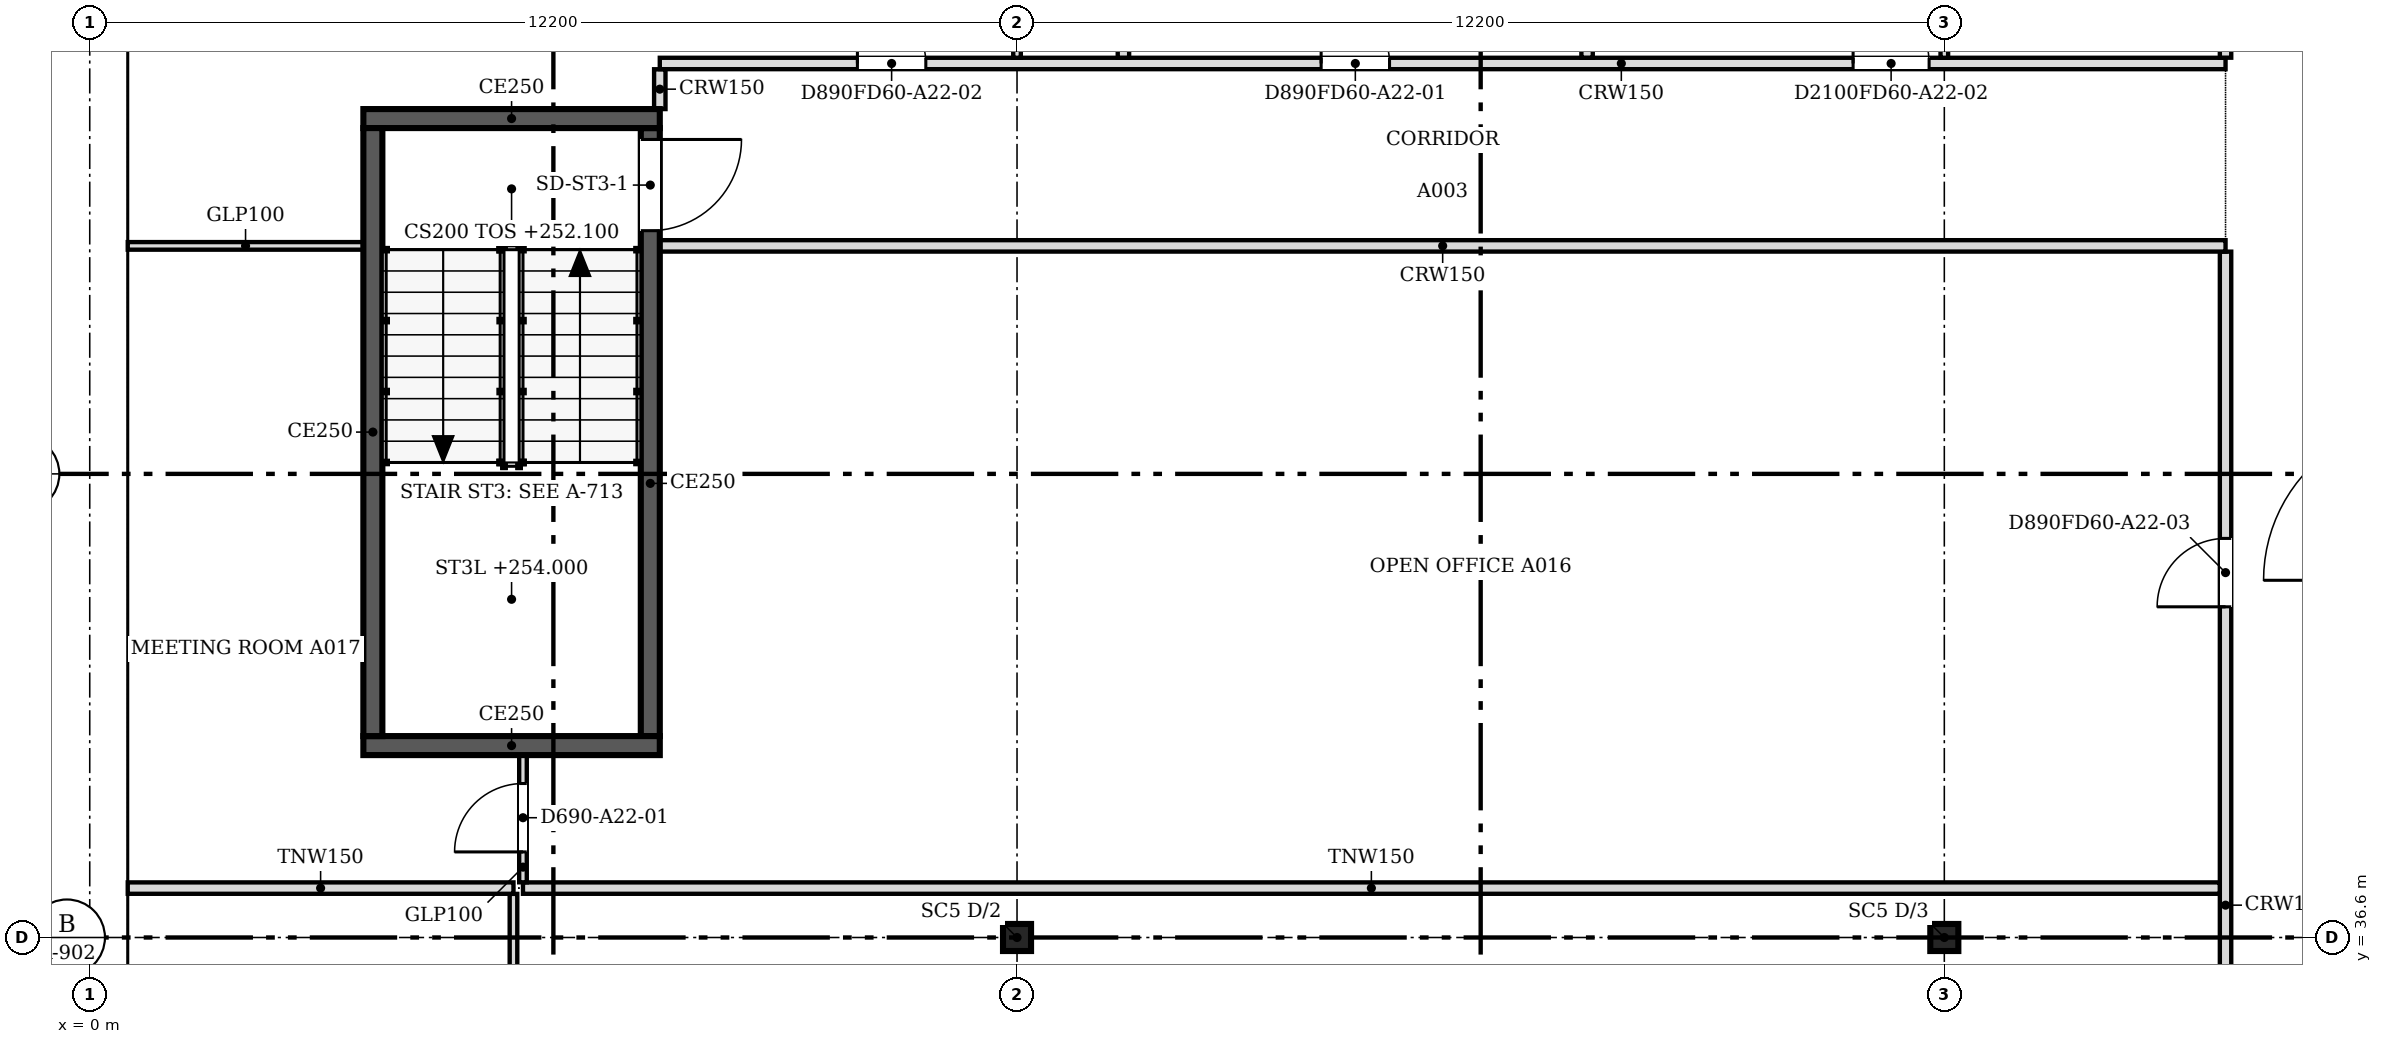
"""IFC4 building model, lengths in metres.
Left out: names, types, materials, properties, quantities, classifications, styles, units other than length and angle.
Written with IfcOpenShell. Run it as: python <this file> out.ifc"""

import sys

from ifc_helpers import new_model, si_unit, direction, frame, frame_2d, origin, origin_2d, place, context, subcontext, project, spatial, polyline, rectangle, i_section, outline, extrude, faceted_brep, source, transform, mapped, element, fill, save


model = new_model("IFC4")
c1 = context("Model", 3, precision=1e-05, world=origin(), true_north=direction((0.0, 1.0)))
c2 = subcontext(c1, "Body", "Model", "MODEL_VIEW")
j1 = project(units=[si_unit("LENGTHUNIT", "METRE"), si_unit("PLANEANGLEUNIT", "RADIAN")], contexts=[c1])
p1 = place(None, origin())
s1 = spatial("IfcSite", under=j1, at=p1, CompositionType="ELEMENT")
p2 = place(p1, origin())
s2 = spatial("IfcBuilding", under=s1, at=p2, CompositionType="ELEMENT")
p3 = place(p2, frame((0.0, 0.0, 252.1)))
s3 = spatial("IfcBuildingStorey", under=s2, at=p3, CompositionType="ELEMENT", Elevation=252.1)
for number, where, z_axis, x_axis in (
    (1, (12.2, 36.6, 0.0), (0.0, 0.0, 1.0), (1.0, 0.0, 0.0)),
    (2, (24.4, 36.6, 0.0), (0.0, 0.0, 1.0), (1.0, 0.0, 0.0)),
):
    element("IfcColumn", number, at=place(p3, frame(where, z_axis=z_axis, x_axis=x_axis)), inside=s3, PredefinedType="COLUMN", context=c2, shape_type="SweptSolid", body=[
        extrude(i_section(OverallWidth=0.369, OverallDepth=0.356, WebThickness=0.011, FlangeThickness=0.018, at=origin_2d()), origin(), (0.0, 0.0, 1.0), 3.6),
    ])
m1 = source(origin(), c2, "Body", "Brep", [
    faceted_brep([(3.003, -0.25, 0.0), (6.053, -0.25, 3.8), (3.003, -0.25, 7.6), (0.0, -0.25, 3.8), (0.047, 0.25, 3.859), (3.003, 0.25, 7.6), (6.053, 0.25, 3.8), (3.003, 0.25, 0.0), (0.047, 0.25, 3.741), (0.0, 0.0, 3.8)], [[[0, 1, 2, 3]], [[4, 5, 6, 7, 8]], [[7, 6, 1, 0]], [[6, 5, 2, 1]], [[5, 4, 9, 3, 2]], [[8, 7, 0, 3, 9]], [[8, 9, 4]]]),
])
p4 = place(p3, frame((0.25, 48.753, -3.8), z_axis=(0.0, 0.0, 1.0), x_axis=(0.0, -1.0, 0.0)))
e3 = element("IfcWall", 3, at=p4, inside=s3, PredefinedType="SOLIDWALL", context=c2, shape_type="MappedRepresentation", body=[
    mapped(m1, transform((0.0, 0.0, 0.0), scale=1.0)),
])
m2 = source(origin(), c2, "Body", "SweptSolid", [
    extrude(outline(polyline([(3.005, 0.401), (5.733, 3.8), (3.005, 7.199), (0.319, 3.8), (3.005, 0.401)])), frame((0.0, 0.26, 0.0), z_axis=(0.0, -1.0, 0.0), x_axis=(1.0, 0.0, 0.0)), (0.0, 0.0, 1.0), 0.52),
])
p5 = place(p4, origin())
e4 = element("IfcOpeningElement", 4, at=p5, cuts=e3, PredefinedType="OPENING", context=c2, shape_type="MappedRepresentation", body=[
    mapped(m2, transform((0.0, 0.0, 0.0), scale=1.0)),
])
m3 = source(origin(), c2, "Body", "Brep", [
    faceted_brep([(3.05, -0.25, 0.0), (6.1, -0.25, 3.8), (6.1, -0.25, 3.8), (3.05, -0.25, 7.6), (0.0, -0.25, 3.8), (0.0, 0.25, 3.8), (3.05, 0.25, 7.6), (6.1, 0.25, 3.8), (6.1, 0.25, 3.8), (3.05, 0.25, 0.0)], [[[0, 1, 2, 3, 4]], [[5, 6, 7, 8, 9]], [[9, 8, 1, 0]], [[7, 6, 3, 2]], [[6, 5, 4, 3]], [[5, 9, 0, 4]], [[1, 8, 7, 2]]]),
])
p6 = place(p3, frame((0.25, 42.7, -3.8), z_axis=(0.0, 0.0, 1.0), x_axis=(0.0, -1.0, 0.0)))
e5 = element("IfcWall", 5, at=p6, inside=s3, PredefinedType="SOLIDWALL", context=c2, shape_type="MappedRepresentation", body=[
    mapped(m3, transform((0.0, 0.0, 0.0), scale=1.0)),
])
m4 = source(origin(), c2, "Body", "SweptSolid", [
    extrude(outline(polyline([(3.05, 0.399), (5.78, 3.8), (3.05, 7.2), (0.321, 3.8), (3.05, 0.399)])), frame((0.0, 0.26, 0.0), z_axis=(0.0, -1.0, 0.0), x_axis=(1.0, 0.0, 0.0)), (0.0, 0.0, 1.0), 0.52),
])
p7 = place(p6, origin())
e6 = element("IfcOpeningElement", 6, at=p7, cuts=e5, PredefinedType="OPENING", context=c2, shape_type="MappedRepresentation", body=[
    mapped(m4, transform((0.0, 0.0, 0.0), scale=1.0)),
])
m5 = source(origin(), c2, "Body", "SweptSolid", [
    extrude(outline(polyline([(3.05, 0.0), (6.1, 3.8), (3.05, 7.6), (0.0, 3.8), (3.05, 0.0)])), frame((0.0, 0.25, 0.0), z_axis=(0.0, -1.0, 0.0), x_axis=(1.0, 0.0, 0.0)), (0.0, 0.0, 1.0), 0.5),
])
p8 = place(p3, frame((0.25, 36.6, -3.8), z_axis=(0.0, 0.0, 1.0), x_axis=(0.0, -1.0, 0.0)))
e7 = element("IfcWall", 7, at=p8, inside=s3, PredefinedType="SOLIDWALL", context=c2, shape_type="MappedRepresentation", body=[
    mapped(m5, transform((0.0, 0.0, 0.0), scale=1.0)),
])
p9 = place(p8, origin())
e8 = element("IfcOpeningElement", 8, at=p9, cuts=e7, PredefinedType="OPENING", context=c2, shape_type="MappedRepresentation", body=[
    mapped(m4, transform((0.0, 0.0, 0.0), scale=1.0)),
])
p10 = place(p2, frame((0.0, 0.0, 255.9)))
s4 = spatial("IfcBuildingStorey", under=s2, at=p10, CompositionType="ELEMENT", Elevation=255.9)
m6 = source(origin(), c2, "Body", "Brep", [
    faceted_brep([(0.047, -0.25, 0.0), (3.05, -0.25, 3.8), (0.047, -0.25, 7.6), (0.0, -0.25, 7.54), (0.0, -0.25, 0.06), (0.093, 0.25, 7.541), (3.05, 0.25, 3.8), (0.093, 0.25, 0.059), (0.047, 0.0, 0.0), (0.047, 0.0, 7.6)], [[[0, 1, 2, 3, 4]], [[5, 6, 7]], [[7, 6, 1, 0, 8]], [[6, 5, 9, 2, 1]], [[3, 2, 9]], [[8, 0, 4]], [[7, 8, 4, 3, 9, 5]]]),
])
p11 = place(p10, frame((0.25, 48.8, -3.8), z_axis=(0.0, 0.0, 1.0), x_axis=(0.0, -1.0, 0.0)))
e9 = element("IfcWall", 9, at=p11, inside=s4, PredefinedType="SOLIDWALL", context=c2, shape_type="MappedRepresentation", body=[
    mapped(m6, transform((0.0, 0.0, 0.0), scale=1.0)),
])
m7 = source(origin(), c2, "Body", "SweptSolid", [
    extrude(outline(polyline([(0.247, 0.656), (2.731, 3.8), (0.247, 6.944), (0.247, 0.656)])), frame((0.0, 0.26, 0.0), z_axis=(0.0, -1.0, 0.0), x_axis=(1.0, 0.0, 0.0)), (0.0, 0.0, 1.0), 0.52),
])
p12 = place(p11, origin())
e10 = element("IfcOpeningElement", 10, at=p12, cuts=e9, PredefinedType="OPENING", context=c2, shape_type="MappedRepresentation", body=[
    mapped(m7, transform((0.0, 0.0, 0.0), scale=1.0)),
])
m8 = source(origin(), c2, "Body", "SweptSolid", [
    extrude(outline(polyline([(3.05, 0.0), (6.1, 3.8), (3.05, 7.6), (0.0, 3.8), (3.05, 0.0)])), frame((0.0, 0.25, 0.0), z_axis=(0.0, -1.0, 0.0), x_axis=(1.0, 0.0, 0.0)), (0.0, 0.0, 1.0), 0.5),
])
p13 = place(p10, frame((0.25, 45.75, -3.8), z_axis=(0.0, 0.0, 1.0), x_axis=(0.0, -1.0, 0.0)))
e11 = element("IfcWall", 11, at=p13, inside=s4, PredefinedType="SOLIDWALL", context=c2, shape_type="MappedRepresentation", body=[
    mapped(m8, transform((0.0, 0.0, 0.0), scale=1.0)),
])
m9 = source(origin(), c2, "Body", "SweptSolid", [
    extrude(outline(polyline([(3.05, 0.399), (5.78, 3.8), (3.05, 7.2), (0.321, 3.8), (3.05, 0.399)])), frame((0.0, 0.26, 0.0), z_axis=(0.0, -1.0, 0.0), x_axis=(1.0, 0.0, 0.0)), (0.0, 0.0, 1.0), 0.52),
])
p14 = place(p13, origin())
e12 = element("IfcOpeningElement", 12, at=p14, cuts=e11, PredefinedType="OPENING", context=c2, shape_type="MappedRepresentation", body=[
    mapped(m9, transform((0.0, 0.0, 0.0), scale=1.0)),
])
m10 = source(origin(), c2, "Body", "Brep", [
    faceted_brep([(3.05, -0.25, 0.0), (6.1, -0.25, 3.8), (6.1, -0.25, 3.8), (3.05, -0.25, 7.6), (0.0, -0.25, 3.8), (0.0, 0.25, 3.8), (3.05, 0.25, 7.6), (6.1, 0.25, 3.8), (6.1, 0.25, 3.8), (3.05, 0.25, 0.0)], [[[0, 1, 2, 3, 4]], [[5, 6, 7, 8, 9]], [[9, 8, 1, 0]], [[7, 6, 3, 2]], [[6, 5, 4, 3]], [[5, 9, 0, 4]], [[1, 8, 7, 2]]]),
])
p15 = place(p10, frame((0.25, 39.65, -3.8), z_axis=(0.0, 0.0, 1.0), x_axis=(0.0, -1.0, 0.0)))
e13 = element("IfcWall", 13, at=p15, inside=s4, PredefinedType="SOLIDWALL", context=c2, shape_type="MappedRepresentation", body=[
    mapped(m10, transform((0.0, 0.0, 0.0), scale=1.0)),
])
p16 = place(p15, origin())
e14 = element("IfcOpeningElement", 14, at=p16, cuts=e13, PredefinedType="OPENING", context=c2, shape_type="MappedRepresentation", body=[
    mapped(m9, transform((0.0, 0.0, 0.0), scale=1.0)),
])
p17 = place(p3, frame((7.5, 39.125, 0.0), z_axis=(0.0, 0.0, 1.0), x_axis=(-1.0, 0.0, 0.0)))
e15 = element("IfcWall", 15, at=p17, inside=s3, PredefinedType="SOLIDWALL", context=c2, shape_type="SweptSolid", body=[
    extrude(rectangle(XDim=3.9, YDim=0.25, at=frame_2d((1.95, 0.0))), origin(), (0.0, 0.0, 1.0), 3.8),
])
p18 = place(p3, frame((3.725, 39.25, 0.0), z_axis=(0.0, 0.0, 1.0), x_axis=(0.0, 1.0, 0.0)))
e16 = element("IfcWall", 16, at=p18, inside=s3, PredefinedType="SOLIDWALL", context=c2, shape_type="SweptSolid", body=[
    extrude(rectangle(XDim=8.0, YDim=0.25, at=frame_2d((4.0, 0.0))), origin(), (0.0, 0.0, 1.0), 3.8),
])
p19 = place(p3, frame((3.6, 47.375, 0.0), z_axis=(0.0, 0.0, 1.0), x_axis=(1.0, 0.0, 0.0)))
e17 = element("IfcWall", 17, at=p19, inside=s3, PredefinedType="SOLIDWALL", context=c2, shape_type="SweptSolid", body=[
    extrude(rectangle(XDim=3.9, YDim=0.25, at=frame_2d((1.95, 0.0))), origin(), (0.0, 0.0, 1.0), 3.8),
])
p20 = place(p3, frame((7.375, 47.25, 0.0), z_axis=(0.0, 0.0, 1.0), x_axis=(0.0, -1.0, 0.0)))
e18 = element("IfcWall", 18, at=p20, inside=s3, PredefinedType="SOLIDWALL", context=c2, shape_type="SweptSolid", body=[
    extrude(rectangle(XDim=8.0, YDim=0.25, at=frame_2d((4.0, 0.0))), origin(), (0.0, 0.0, 1.0), 3.8),
])
m11 = source(origin(), c2, "Body", "SweptSolid", [
    extrude(rectangle(XDim=1.2, YDim=2.1, at=frame_2d((0.6, 1.05))), frame((0.0, 0.135, 0.0), z_axis=(0.0, -1.0, 0.0), x_axis=(1.0, 0.0, 0.0)), (0.0, 0.0, 1.0), 0.27),
])
p21 = place(p20, frame((0.15, 0.0, 0.0)))
e19 = element("IfcOpeningElement", 19, at=p21, cuts=e18, PredefinedType="OPENING", context=c2, shape_type="MappedRepresentation", body=[
    mapped(m11, transform((0.0, 0.0, 0.0), scale=1.0)),
])
p22 = place(p3, frame((28.1, 22.076, 0.0), z_axis=(0.0, 0.0, 1.0), x_axis=(0.0, 1.0, 0.0)))
e20 = element("IfcWall", 20, at=p22, inside=s3, PredefinedType="PARTITIONING", context=c2, shape_type="SweptSolid", body=[
    extrude(rectangle(XDim=23.548, YDim=0.15, at=frame_2d((11.774, 0.0))), origin(), (0.0, 0.0, 1.0), 3.067),
])
m12 = source(origin(), c2, "Body", "SweptSolid", [
    extrude(rectangle(XDim=1.0, YDim=2.1, at=frame_2d((0.5, 1.05))), frame((0.0, 0.085, 0.0), z_axis=(0.0, -1.0, 0.0), x_axis=(1.0, 0.0, 0.0)), (0.0, 0.0, 1.0), 0.17),
])
p23 = place(p22, frame((2.5, 0.0, 0.0)))
e21 = element("IfcOpeningElement", 21, at=p23, cuts=e20, PredefinedType="OPENING", context=c2, shape_type="MappedRepresentation", body=[
    mapped(m12, transform((0.0, 0.0, 0.0), scale=1.0)),
])
m13 = source(origin(), c2, "Body", "SweptSolid", [
    extrude(rectangle(XDim=0.9, YDim=2.1, at=frame_2d((0.45, 1.05))), frame((0.0, 0.085, 0.0), z_axis=(0.0, -1.0, 0.0), x_axis=(1.0, 0.0, 0.0)), (0.0, 0.0, 1.0), 0.17),
])
p24 = place(p22, frame((18.875, 0.0, 0.0)))
e22 = element("IfcOpeningElement", 22, at=p24, cuts=e20, PredefinedType="OPENING", context=c2, shape_type="MappedRepresentation", body=[
    mapped(m13, transform((0.0, 0.0, 0.0), scale=1.0)),
])
p25 = place(p22, frame((10.124, 0.0, 0.0)))
e23 = element("IfcOpeningElement", 23, at=p25, cuts=e20, PredefinedType="OPENING", context=c2, shape_type="MappedRepresentation", body=[
    mapped(m13, transform((0.0, 0.0, 0.0), scale=1.0)),
])
p26 = place(p3, frame((5.575, 32.571, 0.0), z_axis=(0.0, 0.0, 1.0), x_axis=(0.0, 1.0, 0.0)))
e24 = element("IfcWall", 24, at=p26, inside=s3, PredefinedType="PARTITIONING", context=c2, shape_type="SweptSolid", body=[
    extrude(rectangle(XDim=4.603, YDim=0.1, at=frame_2d((2.301, 0.0))), origin(), (0.0, 0.0, 1.0), 3.067),
])
m14 = source(origin(), c2, "Body", "SweptSolid", [
    extrude(rectangle(XDim=0.9, YDim=2.1, at=frame_2d((0.45, 1.05))), frame((0.0, 0.06, 0.0), z_axis=(0.0, -1.0, 0.0), x_axis=(1.0, 0.0, 0.0)), (0.0, 0.0, 1.0), 0.12),
])
p27 = place(p26, frame((1.9, 0.0, 0.0)))
e25 = element("IfcOpeningElement", 25, at=p27, cuts=e24, PredefinedType="OPENING", context=c2, shape_type="MappedRepresentation", body=[
    mapped(m14, transform((0.0, 0.0, 0.0), scale=1.0)),
])
p28 = place(p3, frame((0.5, 37.25, 0.0), z_axis=(0.0, 0.0, 1.0), x_axis=(1.0, 0.0, 0.0)))
e26 = element("IfcWall", 26, at=p28, inside=s3, PredefinedType="PARTITIONING", context=c2, shape_type="SweptSolid", body=[
    extrude(rectangle(XDim=5.075, YDim=0.15, at=frame_2d((2.538, 0.0))), origin(), (0.0, 0.0, 1.0), 3.067),
])
p29 = place(p3, frame((5.7, 37.25, 0.0), z_axis=(0.0, 0.0, 1.0), x_axis=(1.0, 0.0, 0.0)))
e27 = element("IfcWall", 27, at=p29, inside=s3, PredefinedType="PARTITIONING", context=c2, shape_type="SweptSolid", body=[
    extrude(rectangle(XDim=22.324, YDim=0.15, at=frame_2d((11.162, 0.0))), origin(), (0.0, 0.0, 1.0), 3.067),
])
p30 = place(p3, frame((5.7, 37.326, 0.0), z_axis=(0.0, 0.0, 1.0), x_axis=(0.0, 1.0, 0.0)))
e28 = element("IfcWall", 28, at=p30, inside=s3, PredefinedType="PARTITIONING", context=c2, shape_type="SweptSolid", body=[
    extrude(rectangle(XDim=1.674, YDim=0.1, at=frame_2d((0.837, 0.0))), origin(), (0.0, 0.0, 1.0), 3.067),
])
p31 = place(p30, frame((0.4, 0.0, 0.0)))
e29 = element("IfcOpeningElement", 29, at=p31, cuts=e28, PredefinedType="OPENING", context=c2, shape_type="MappedRepresentation", body=[
    mapped(m14, transform((0.0, 0.0, 0.0), scale=1.0)),
])
p32 = place(p3, frame((0.5, 45.7, 0.0), z_axis=(0.0, 0.0, 1.0), x_axis=(1.0, 0.0, 0.0)))
e30 = element("IfcWall", 30, at=p32, inside=s3, PredefinedType="PARTITIONING", context=c2, shape_type="SweptSolid", body=[
    extrude(rectangle(XDim=3.1, YDim=0.1, at=frame_2d((1.55, 0.0))), origin(), (0.0, 0.0, 1.0), 3.067),
])
p33 = place(p3, frame((7.5, 45.7, 0.0), z_axis=(0.0, 0.0, 1.0), x_axis=(1.0, 0.0, 0.0)))
e31 = element("IfcWall", 31, at=p33, inside=s3, PredefinedType="PARTITIONING", context=c2, shape_type="SweptSolid", body=[
    extrude(rectangle(XDim=20.6, YDim=0.15, at=frame_2d((10.3, 0.0))), origin(), (0.0, 0.0, 1.0), 3.067),
])
p34 = place(p3, frame((7.5, 47.5, 0.0), z_axis=(0.0, 0.0, 1.0), x_axis=(0.0, 1.0, 0.0)))
e32 = element("IfcWall", 32, at=p34, inside=s3, PredefinedType="PARTITIONING", context=c2, shape_type="SweptSolid", body=[
    extrude(rectangle(XDim=0.524, YDim=0.15, at=frame_2d((0.262, 0.0))), origin(), (0.0, 0.0, 1.0), 3.067),
])
p35 = place(p3, frame((7.5, 48.1, 0.0), z_axis=(0.0, 0.0, 1.0), x_axis=(1.0, 0.0, 0.0)))
e33 = element("IfcWall", 33, at=p35, inside=s3, PredefinedType="PARTITIONING", context=c2, shape_type="SweptSolid", body=[
    extrude(rectangle(XDim=20.6, YDim=0.15, at=frame_2d((10.3, 0.0))), origin(), (0.0, 0.0, 1.0), 3.067),
])
p36 = place(p35, frame((8.701, 0.0, 0.0)))
e34 = element("IfcOpeningElement", 34, at=p36, cuts=e33, PredefinedType="OPENING", context=c2, shape_type="MappedRepresentation", body=[
    mapped(m13, transform((0.0, 0.0, 0.0), scale=1.0)),
])
p37 = place(p35, frame((2.6, 0.0, 0.0)))
e35 = element("IfcOpeningElement", 35, at=p37, cuts=e33, PredefinedType="OPENING", context=c2, shape_type="MappedRepresentation", body=[
    mapped(m13, transform((0.0, 0.0, 0.0), scale=1.0)),
])
p38 = place(p35, frame((15.7, 0.0, 0.0)))
e36 = element("IfcOpeningElement", 36, at=p38, cuts=e33, PredefinedType="OPENING", context=c2, shape_type="MappedRepresentation", body=[
    mapped(m12, transform((0.0, 0.0, 0.0), scale=1.0)),
])
p39 = place(p3, frame((13.6, 48.176, 0.0), z_axis=(0.0, 0.0, 1.0), x_axis=(0.0, 1.0, 0.0)))
e37 = element("IfcWall", 37, at=p39, inside=s3, PredefinedType="PARTITIONING", context=c2, shape_type="SweptSolid", body=[
    extrude(rectangle(XDim=2.924, YDim=0.15, at=frame_2d((1.462, 0.0))), origin(), (0.0, 0.0, 1.0), 3.067),
])
p40 = place(p3, frame((19.7, 48.176, 0.0), z_axis=(0.0, 0.0, 1.0), x_axis=(0.0, 1.0, 0.0)))
e38 = element("IfcWall", 38, at=p40, inside=s3, PredefinedType="PARTITIONING", context=c2, shape_type="SweptSolid", body=[
    extrude(rectangle(XDim=6.224, YDim=0.15, at=frame_2d((3.112, 0.0))), origin(), (0.0, 0.0, 1.0), 3.067),
])
p41 = place(p3, frame((28.1, 48.176, 0.0), z_axis=(0.0, 0.0, 1.0), x_axis=(0.0, 1.0, 0.0)))
e39 = element("IfcWall", 39, at=p41, inside=s3, PredefinedType="PARTITIONING", context=c2, shape_type="SweptSolid", body=[
    extrude(rectangle(XDim=2.948, YDim=0.15, at=frame_2d((1.474, 0.0))), origin(), (0.0, 0.0, 1.0), 3.067),
])
for number, where, z_axis, x_axis in (
    (40, (12.2, 48.6, 0.0), (0.0, 0.0, 1.0), (0.0, -1.0, 0.0)),
    (41, (24.4, 48.6, 0.0), (0.0, 0.0, 1.0), (0.0, -1.0, 0.0)),
):
    element("IfcWall", number, at=place(p3, frame(where, z_axis=z_axis, x_axis=x_axis)), inside=s3, PredefinedType="PARTITIONING", context=c2, shape_type="SweptSolid", body=[
        extrude(rectangle(XDim=0.425, YDim=0.1, at=frame_2d((0.212, 0.0))), origin(), (0.0, 0.0, 1.0), 3.067),
    ])
m15 = source(origin(), c2, "Body", "SweptSolid", [
    extrude(rectangle(XDim=1.2, YDim=2.1, at=frame_2d((0.6, 1.05))), frame((0.0, 0.025, 0.0), z_axis=(0.0, -1.0, 0.0), x_axis=(1.0, 0.0, 0.0)), (0.0, 0.0, 1.0), 0.05),
])
p42 = place(p21, origin())
e42 = element("IfcDoor", 42, at=p42, inside=s3, OperationType="SINGLE_SWING_LEFT", PredefinedType="DOOR", context=c2, shape_type="MappedRepresentation", body=[
    mapped(m15, transform((0.0, 0.0, 0.0), scale=1.0)),
])
fill(e19, e42)
m16 = source(origin(), c2, "Body", "SweptSolid", [
    extrude(rectangle(XDim=0.9, YDim=2.1, at=frame_2d((0.45, 1.05))), frame((0.0, 0.025, 0.0), z_axis=(0.0, -1.0, 0.0), x_axis=(1.0, 0.0, 0.0)), (0.0, 0.0, 1.0), 0.05),
])
p43 = place(p31, origin())
e43 = element("IfcDoor", 43, at=p43, inside=s3, OperationType="SINGLE_SWING_LEFT", PredefinedType="DOOR", context=c2, shape_type="MappedRepresentation", body=[
    mapped(m16, transform((0.0, 0.0, 0.0), scale=1.0)),
])
fill(e29, e43)
p44 = place(p36, origin())
e44 = element("IfcDoor", 44, at=p44, inside=s3, OperationType="SINGLE_SWING_LEFT", PredefinedType="DOOR", context=c2, shape_type="MappedRepresentation", body=[
    mapped(m16, transform((0.0, 0.0, 0.0), scale=1.0)),
])
fill(e34, e44)
p45 = place(p37, origin())
e45 = element("IfcDoor", 45, at=p45, inside=s3, OperationType="SINGLE_SWING_LEFT", PredefinedType="DOOR", context=c2, shape_type="MappedRepresentation", body=[
    mapped(m16, transform((0.0, 0.0, 0.0), scale=1.0)),
])
fill(e35, e45)
p46 = place(p24, origin())
e46 = element("IfcDoor", 46, at=p46, inside=s3, OperationType="SINGLE_SWING_LEFT", PredefinedType="DOOR", context=c2, shape_type="MappedRepresentation", body=[
    mapped(m16, transform((0.0, 0.0, 0.0), scale=1.0)),
])
fill(e22, e46)
m17 = source(origin(), c2, "Body", "SweptSolid", [
    extrude(rectangle(XDim=1.0, YDim=2.1, at=frame_2d((0.5, 1.05))), frame((0.0, 0.025, 0.0), z_axis=(0.0, -1.0, 0.0), x_axis=(1.0, 0.0, 0.0)), (0.0, 0.0, 1.0), 0.05),
])
p47 = place(p38, origin())
e47 = element("IfcDoor", 47, at=p47, inside=s3, OperationType="SINGLE_SWING_LEFT", PredefinedType="DOOR", context=c2, shape_type="MappedRepresentation", body=[
    mapped(m17, transform((0.0, 0.0, 0.0), scale=1.0)),
])
fill(e36, e47)
save(model, sys.argv[1])
